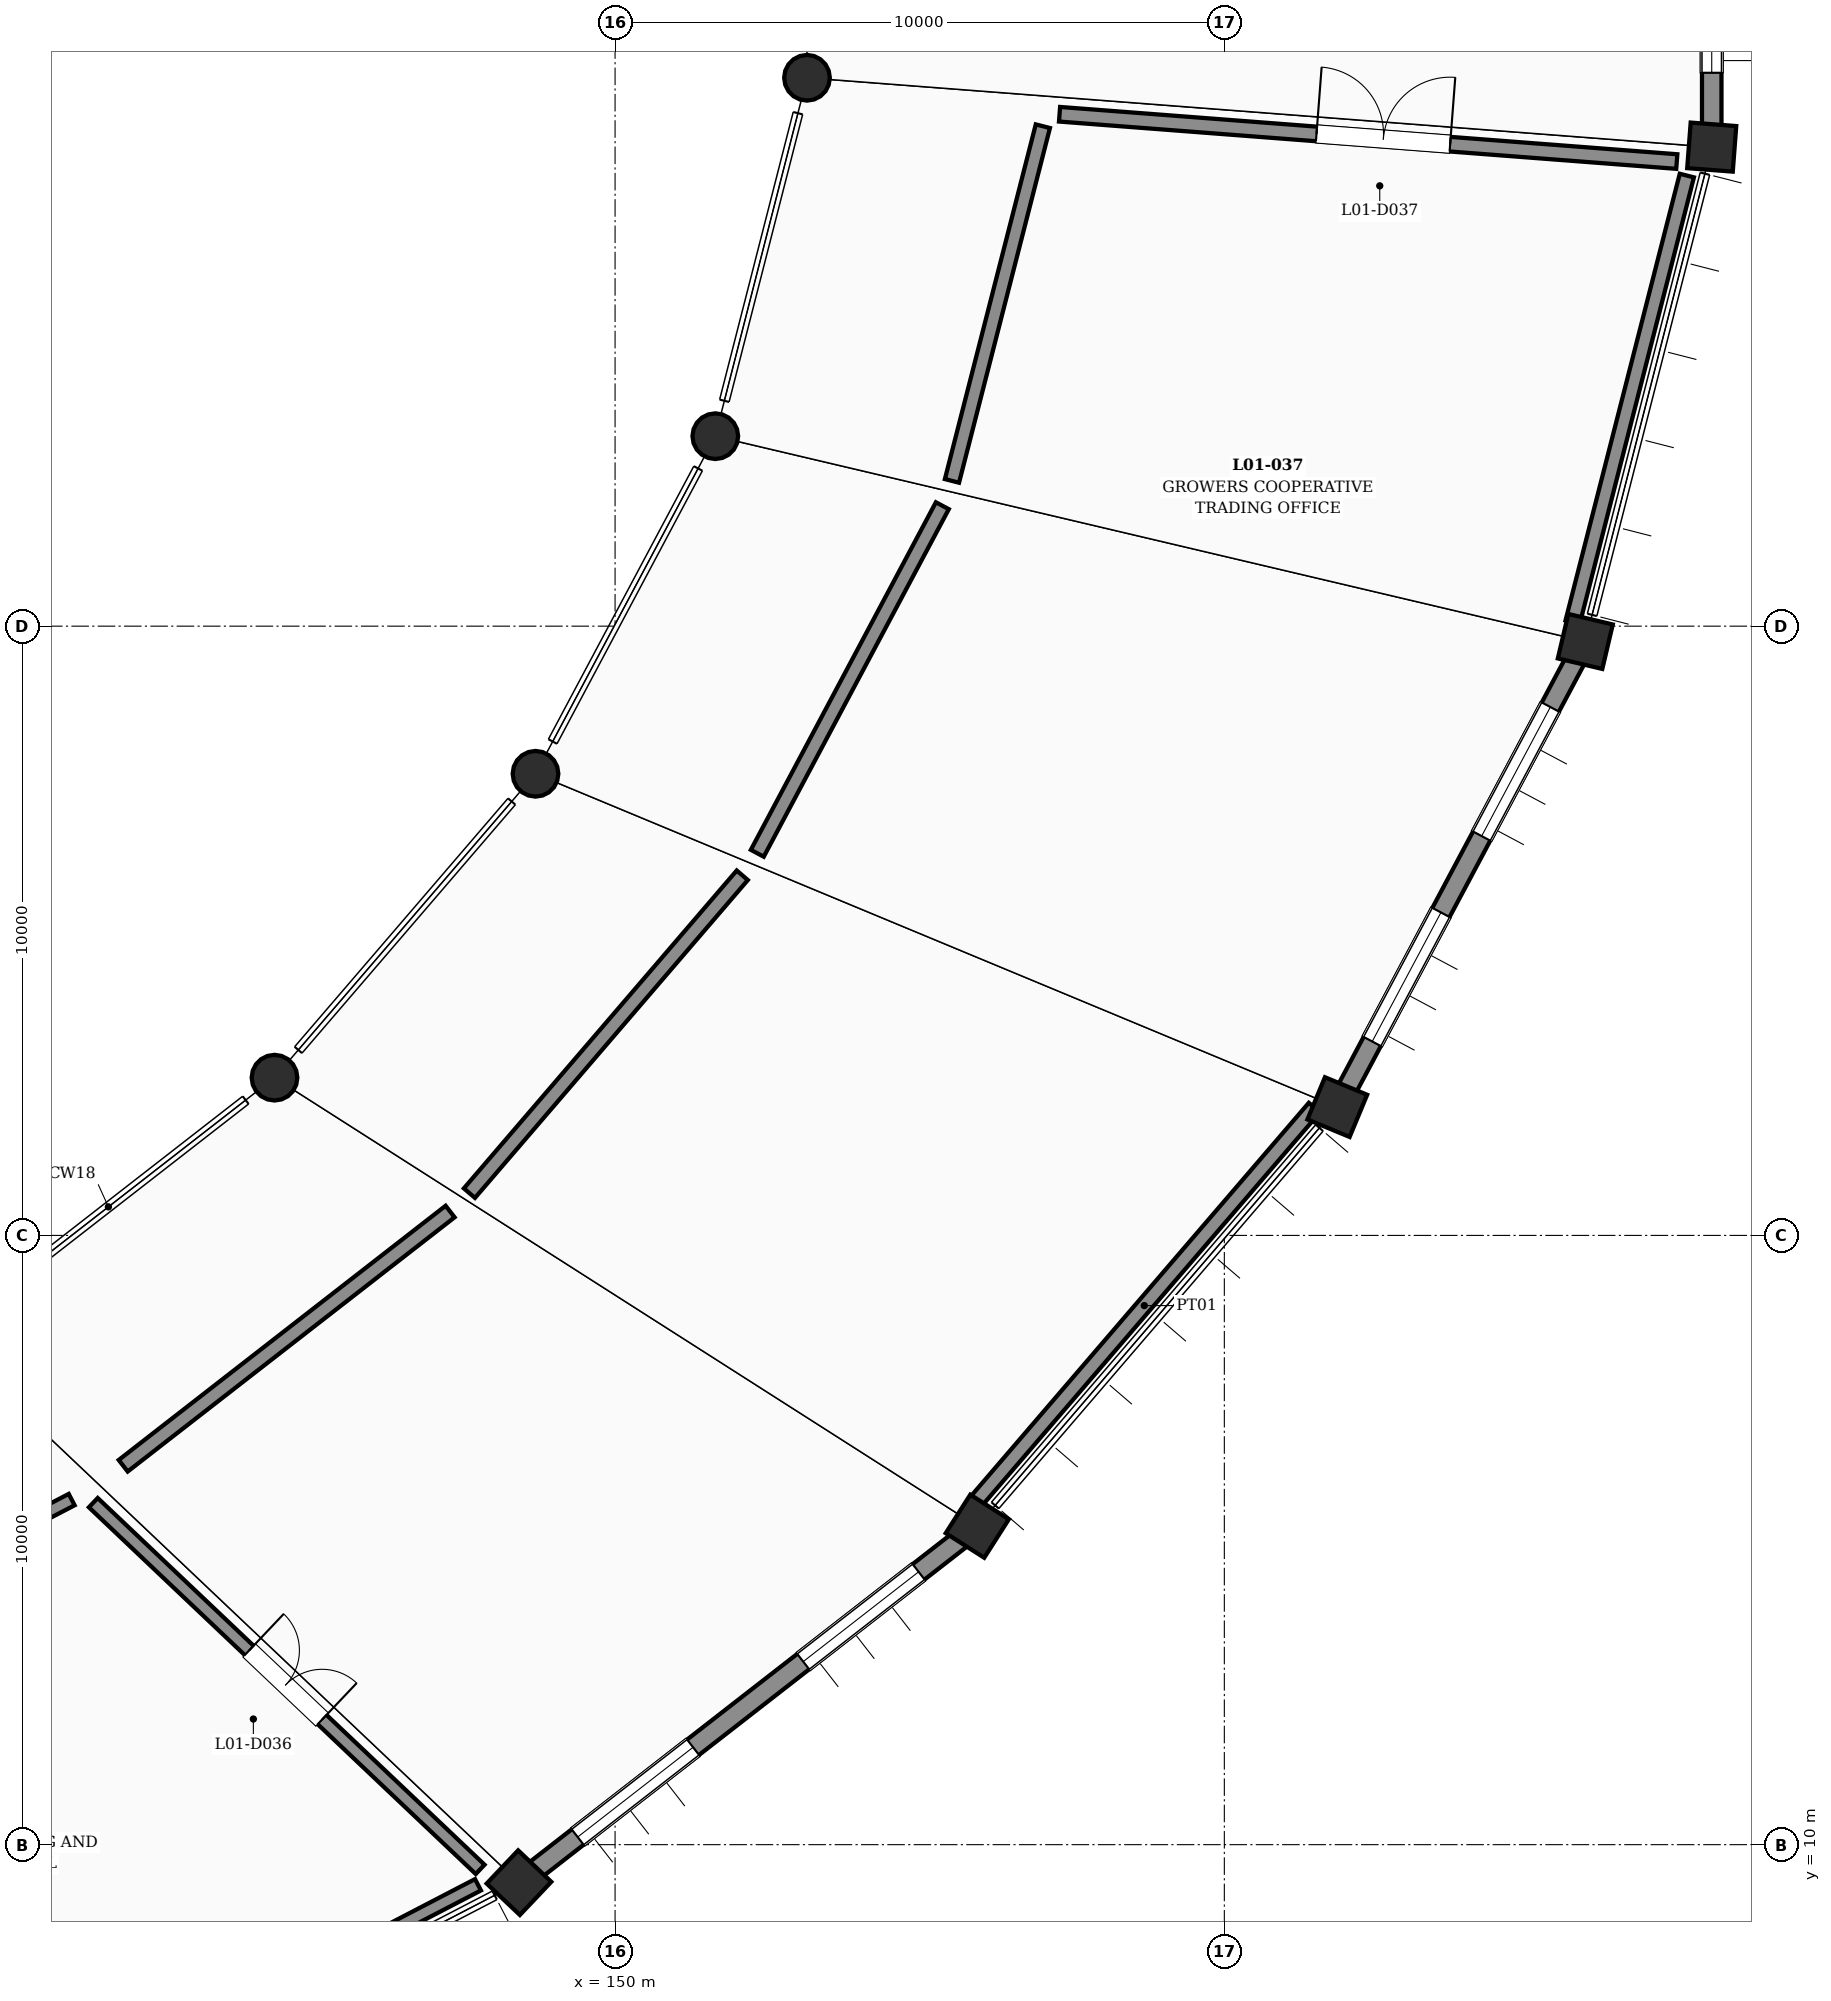
"""IFC4 building model, lengths in metres.
Left out: names, types, materials, properties, quantities, classifications, styles, units other than length and angle.
Written with IfcOpenShell. Run it as: python <this file> out.ifc"""

import sys

from ifc_helpers import new_model, si_unit, direction, frame, frame_2d, origin, origin_2d, place, context, subcontext, project, spatial, rectangle, circle, extrude, element, fill, save


model = new_model("IFC4")
c1 = context("Model", 3, precision=1e-05, world=origin(), true_north=direction((0.0, 1.0)))
c2 = subcontext(c1, "Body", "Model", "MODEL_VIEW")
j1 = project(units=[si_unit("LENGTHUNIT", "METRE"), si_unit("PLANEANGLEUNIT", "RADIAN")], contexts=[c1])
p1 = place(None, origin())
s1 = spatial("IfcSite", under=j1, at=p1, CompositionType="ELEMENT")
p2 = place(p1, origin())
s2 = spatial("IfcBuilding", under=s1, at=p2, CompositionType="ELEMENT")
p3 = place(p2, frame((0.0, 0.0, 6.0)))
s3 = spatial("IfcBuildingStorey", under=s2, at=p3, CompositionType="ELEMENT", Elevation=6.0)
for number, where, z_axis, x_axis in (
    (1, (148.423, 9.376, 0.0), (0.0, 0.0, 1.0), (0.688, 0.726, 0.0)),
    (2, (155.945, 15.227, 0.0), (0.0, 0.0, 1.0), (0.538, 0.843, 0.0)),
):
    element("IfcColumn", number, at=place(p3, frame(where, z_axis=z_axis, x_axis=x_axis)), inside=s3, PredefinedType="COLUMN", context=c2, shape_type="SweptSolid", body=[
        extrude(rectangle(XDim=0.75, YDim=0.75, at=origin_2d()), origin(), (0.0, 0.0, 1.0), 4.8),
    ])
p4 = place(p3, frame((144.41, 22.589, 0.0), z_axis=(0.0, 0.0, 1.0), x_axis=(1.0, 0.0, 0.0)))
e3 = element("IfcColumn", 3, at=p4, inside=s3, PredefinedType="COLUMN", context=c2, shape_type="SweptSolid", body=[
    extrude(circle(Radius=0.375, at=origin_2d()), origin(), (0.0, 0.0, 1.0), 4.8),
])
p5 = place(p3, frame((161.854, 22.106, 0.0), z_axis=(0.0, 0.0, 1.0), x_axis=(0.383811878264, 0.923411307113, 0.0)))
e4 = element("IfcColumn", 4, at=p5, inside=s3, PredefinedType="COLUMN", context=c2, shape_type="SweptSolid", body=[
    extrude(rectangle(XDim=0.75, YDim=0.75, at=origin_2d()), origin(), (0.0, 0.0, 1.0), 4.8),
])
p6 = place(p3, frame((148.694, 27.577, 0.0), z_axis=(0.0, 0.0, 1.0), x_axis=(1.0, 0.0, 0.0)))
e5 = element("IfcColumn", 5, at=p6, inside=s3, PredefinedType="COLUMN", context=c2, shape_type="SweptSolid", body=[
    extrude(circle(Radius=0.375, at=origin_2d()), origin(), (0.0, 0.0, 1.0), 4.8),
])
p7 = place(p3, frame((165.925, 29.749, 0.0), z_axis=(0.0, 0.0, 1.0), x_axis=(0.229710019669, 0.973259115993, 0.0)))
e6 = element("IfcColumn", 6, at=p7, inside=s3, PredefinedType="COLUMN", context=c2, shape_type="SweptSolid", body=[
    extrude(rectangle(XDim=0.75, YDim=0.75, at=origin_2d()), origin(), (0.0, 0.0, 1.0), 4.8),
])
p8 = place(p3, frame((151.645, 33.118, 0.0), z_axis=(0.0, 0.0, 1.0), x_axis=(1.0, 0.0, 0.0)))
e7 = element("IfcColumn", 7, at=p8, inside=s3, PredefinedType="COLUMN", context=c2, shape_type="SweptSolid", body=[
    extrude(circle(Radius=0.375, at=origin_2d()), origin(), (0.0, 0.0, 1.0), 4.8),
])
p9 = place(p3, frame((168.0, 37.863, 0.0), z_axis=(0.0, 0.0, 1.0), x_axis=(0.076370986393, 0.997079471475, 0.0)))
e8 = element("IfcColumn", 8, at=p9, inside=s3, PredefinedType="COLUMN", context=c2, shape_type="SweptSolid", body=[
    extrude(rectangle(XDim=0.75, YDim=0.75, at=origin_2d()), origin(), (0.0, 0.0, 1.0), 4.8),
])
p10 = place(p3, frame((153.15, 39.001, 0.0), z_axis=(0.0, 0.0, 1.0), x_axis=(1.0, 0.0, 0.0)))
e9 = element("IfcColumn", 9, at=p10, inside=s3, PredefinedType="COLUMN", context=c2, shape_type="SweptSolid", body=[
    extrude(circle(Radius=0.375, at=origin_2d()), origin(), (0.0, 0.0, 1.0), 4.8),
])
p11 = place(p3, frame((148.636, 9.542, 0.0), z_axis=(0.0, 0.0, 1.0), x_axis=(0.789327357341, 0.613972575082, 0.0)))
e10 = element("IfcWall", 10, at=p11, inside=s3, PredefinedType="SOLIDWALL", context=c2, shape_type="SweptSolid", body=[
    extrude(rectangle(XDim=8.99, YDim=0.32, at=frame_2d((4.495, 0.0))), origin(), (0.0, 0.0, 1.0), 3.61),
])
p12 = place(p11, frame((0.95, 0.0, 0.95)))
e11 = element("IfcOpeningElement", 11, at=p12, cuts=e10, PredefinedType="OPENING", context=c2, shape_type="SweptSolid", body=[
    extrude(rectangle(XDim=2.4, YDim=2.1, at=frame_2d((1.2, 1.05))), frame((0.0, 0.17, 0.0), z_axis=(0.0, -1.0, 0.0), x_axis=(1.0, 0.0, 0.0)), (0.0, 0.0, 1.0), 0.34),
])
p13 = place(p11, frame((5.64, 0.0, 0.95)))
e12 = element("IfcOpeningElement", 12, at=p13, cuts=e10, PredefinedType="OPENING", context=c2, shape_type="SweptSolid", body=[
    extrude(rectangle(XDim=2.4, YDim=2.1, at=frame_2d((1.2, 1.05))), frame((0.0, 0.17, 0.0), z_axis=(0.0, -1.0, 0.0), x_axis=(1.0, 0.0, 0.0)), (0.0, 0.0, 1.0), 0.34),
])
p14 = place(p3, frame((161.981, 22.344, 0.0), z_axis=(0.0, 0.0, 1.0), x_axis=(0.47010905891, 0.882608334841, 0.0)))
e13 = element("IfcWall", 13, at=p14, inside=s3, PredefinedType="SOLIDWALL", context=c2, shape_type="SweptSolid", body=[
    extrude(rectangle(XDim=8.12, YDim=0.32, at=frame_2d((4.06, 0.0))), origin(), (0.0, 0.0, 1.0), 3.61),
])
p15 = place(p14, frame((0.95, 0.0, 0.95)))
e14 = element("IfcOpeningElement", 14, at=p15, cuts=e13, PredefinedType="OPENING", context=c2, shape_type="SweptSolid", body=[
    extrude(rectangle(XDim=2.4, YDim=2.1, at=frame_2d((1.2, 1.05))), frame((0.0, 0.17, 0.0), z_axis=(0.0, -1.0, 0.0), x_axis=(1.0, 0.0, 0.0)), (0.0, 0.0, 1.0), 0.34),
])
p16 = place(p14, frame((4.77, 0.0, 0.95)))
e15 = element("IfcOpeningElement", 15, at=p16, cuts=e13, PredefinedType="OPENING", context=c2, shape_type="SweptSolid", body=[
    extrude(rectangle(XDim=2.4, YDim=2.1, at=frame_2d((1.2, 1.05))), frame((0.0, 0.17, 0.0), z_axis=(0.0, -1.0, 0.0), x_axis=(1.0, 0.0, 0.0)), (0.0, 0.0, 1.0), 0.34),
])
p17 = place(p3, frame((168.0, 38.133, 0.0), z_axis=(0.0, 0.0, 1.0), x_axis=(0.0, 1.0, 0.0)))
e16 = element("IfcWall", 16, at=p17, inside=s3, PredefinedType="SOLIDWALL", context=c2, shape_type="SweptSolid", body=[
    extrude(rectangle(XDim=7.734, YDim=0.32, at=frame_2d((3.867, 0.0))), origin(), (0.0, 0.0, 1.0), 3.61),
])
p18 = place(p17, frame((0.95, 0.0, 0.95)))
e17 = element("IfcOpeningElement", 17, at=p18, cuts=e16, PredefinedType="OPENING", context=c2, shape_type="SweptSolid", body=[
    extrude(rectangle(XDim=2.4, YDim=2.1, at=frame_2d((1.2, 1.05))), frame((0.0, 0.17, 0.0), z_axis=(0.0, -1.0, 0.0), x_axis=(1.0, 0.0, 0.0)), (0.0, 0.0, 1.0), 0.34),
])
p19 = place(p17, frame((4.384, 0.0, 0.95)))
e18 = element("IfcOpeningElement", 18, at=p19, cuts=e16, PredefinedType="OPENING", context=c2, shape_type="SweptSolid", body=[
    extrude(rectangle(XDim=2.4, YDim=2.1, at=frame_2d((1.2, 1.05))), frame((0.0, 0.17, 0.0), z_axis=(0.0, -1.0, 0.0), x_axis=(1.0, 0.0, 0.0)), (0.0, 0.0, 1.0), 0.34),
])
p20 = place(p3, frame((134.625, 12.309, 0.0), z_axis=(0.0, 0.0, 1.0), x_axis=(0.887324465007, 0.461145631878, 0.0)))
e19 = element("IfcWall", 19, at=p20, inside=s3, PredefinedType="PARTITIONING", context=c2, shape_type="SweptSolid", body=[
    extrude(rectangle(XDim=7.275, YDim=0.21, at=frame_2d((3.638, 0.0))), origin(), (0.0, 0.0, 1.0), 4.46),
])
p21 = place(p3, frame((141.436, 15.614, 0.0), z_axis=(0.0, 0.0, 1.0), x_axis=(0.725745871032, -0.687962884667, 0.0)))
e20 = element("IfcWall", 20, at=p21, inside=s3, PredefinedType="PARTITIONING", context=c2, shape_type="SweptSolid", body=[
    extrude(rectangle(XDim=8.749, YDim=0.21, at=frame_2d((4.375, 0.0))), origin(), (0.0, 0.0, 1.0), 3.56),
])
p22 = place(p21, frame((3.525, 0.0, 0.0)))
e21 = element("IfcOpeningElement", 21, at=p22, cuts=e20, PredefinedType="OPENING", context=c2, shape_type="SweptSolid", body=[
    extrude(rectangle(XDim=1.65, YDim=2.25, at=frame_2d((0.825, 1.125))), frame((0.0, 0.115, 0.0), z_axis=(0.0, -1.0, 0.0), x_axis=(1.0, 0.0, 0.0)), (0.0, 0.0, 1.0), 0.23),
])
p23 = place(p3, frame((147.75, 9.342, 0.0), z_axis=(0.0, 0.0, 1.0), x_axis=(-0.887317698476, -0.461158651627, 0.0)))
e22 = element("IfcWall", 22, at=p23, inside=s3, PredefinedType="PARTITIONING", context=c2, shape_type="SweptSolid", body=[
    extrude(rectangle(XDim=9.11, YDim=0.21, at=frame_2d((4.555, 0.0))), origin(), (0.0, 0.0, 1.0), 3.61),
])
p24 = place(p3, frame((147.609, 20.694, 0.0), z_axis=(0.0, 0.0, 1.0), x_axis=(0.651320491165, 0.758802752887, 0.0)))
e23 = element("IfcWall", 23, at=p24, inside=s3, PredefinedType="PARTITIONING", context=c2, shape_type="SweptSolid", body=[
    extrude(rectangle(XDim=6.876, YDim=0.24, at=frame_2d((3.438, 0.0))), origin(), (0.0, 0.0, 1.0), 4.46),
])
p25 = place(p3, frame((152.334, 26.272, 0.0), z_axis=(0.0, 0.0, 1.0), x_axis=(0.4699449875, 0.882695705622, 0.0)))
e24 = element("IfcWall", 24, at=p25, inside=s3, PredefinedType="PARTITIONING", context=c2, shape_type="SweptSolid", body=[
    extrude(rectangle(XDim=6.463, YDim=0.24, at=frame_2d((3.231, 0.0))), origin(), (0.0, 0.0, 1.0), 4.46),
])
p26 = place(p3, frame((155.53, 32.384, 0.0), z_axis=(0.0, 0.0, 1.0), x_axis=(0.248247314143, 0.968696686802, 0.0)))
e25 = element("IfcWall", 25, at=p26, inside=s3, PredefinedType="PARTITIONING", context=c2, shape_type="SweptSolid", body=[
    extrude(rectangle(XDim=6.01, YDim=0.24, at=frame_2d((3.005, 0.0))), origin(), (0.0, 0.0, 1.0), 4.46),
])
p27 = place(p3, frame((157.295, 38.402, 0.0), z_axis=(0.0, 0.0, 1.0), x_axis=(0.997076634039, -0.076408022176, 0.0)))
e26 = element("IfcWall", 26, at=p27, inside=s3, PredefinedType="PARTITIONING", context=c2, shape_type="SweptSolid", body=[
    extrude(rectangle(XDim=10.161, YDim=0.24, at=frame_2d((5.081, 0.0))), origin(), (0.0, 0.0, 1.0), 3.56),
])
p28 = place(p27, frame((4.23, 0.0, 0.0)))
e27 = element("IfcOpeningElement", 27, at=p28, cuts=e26, PredefinedType="OPENING", context=c2, shape_type="SweptSolid", body=[
    extrude(rectangle(XDim=2.2, YDim=2.35, at=frame_2d((1.1, 1.175))), frame((0.0, 0.13, 0.0), z_axis=(0.0, -1.0, 0.0), x_axis=(1.0, 0.0, 0.0)), (0.0, 0.0, 1.0), 0.26),
])
p29 = place(p3, frame((167.592, 37.396, 0.0), z_axis=(0.0, 0.0, 1.0), x_axis=(-0.247762128405, -0.968820895588, 0.0)))
e28 = element("IfcWall", 28, at=p29, inside=s3, PredefinedType="PARTITIONING", context=c2, shape_type="SweptSolid", body=[
    extrude(rectangle(XDim=7.568, YDim=0.24, at=frame_2d((3.784, 0.0))), origin(), (0.0, 0.0, 1.0), 3.61),
])
p30 = place(p3, frame((161.478, 22.098, 0.0), z_axis=(0.0, 0.0, 1.0), x_axis=(-0.651588761732, -0.758572399699, 0.0)))
e29 = element("IfcWall", 29, at=p30, inside=s3, PredefinedType="PARTITIONING", context=c2, shape_type="SweptSolid", body=[
    extrude(rectangle(XDim=8.569, YDim=0.24, at=frame_2d((4.285, 0.0))), origin(), (0.0, 0.0, 1.0), 3.61),
])
p31 = place(p3, frame((141.927, 16.219, 0.0), z_axis=(0.0, 0.0, 1.0), x_axis=(0.789373491507, 0.613913260083, 0.0)))
e30 = element("IfcWall", 30, at=p31, inside=s3, PredefinedType="PARTITIONING", context=c2, shape_type="SweptSolid", body=[
    extrude(rectangle(XDim=6.797, YDim=0.24, at=frame_2d((3.398, 0.0))), origin(), (0.0, 0.0, 1.0), 4.46),
])
p32 = place(p12, origin())
e31 = element("IfcWindow", 31, at=p32, inside=s3, PartitioningType="SINGLE_PANEL", PredefinedType="WINDOW", context=c2, shape_type="SweptSolid", body=[
    extrude(rectangle(XDim=2.4, YDim=2.1, at=frame_2d((1.2, 1.05))), frame((0.0, 0.03, 0.0), z_axis=(0.0, -1.0, 0.0), x_axis=(1.0, 0.0, 0.0)), (0.0, 0.0, 1.0), 0.06),
])
fill(e11, e31)
p33 = place(p13, origin())
e32 = element("IfcWindow", 32, at=p33, inside=s3, PartitioningType="SINGLE_PANEL", PredefinedType="WINDOW", context=c2, shape_type="SweptSolid", body=[
    extrude(rectangle(XDim=2.4, YDim=2.1, at=frame_2d((1.2, 1.05))), frame((0.0, 0.03, 0.0), z_axis=(0.0, -1.0, 0.0), x_axis=(1.0, 0.0, 0.0)), (0.0, 0.0, 1.0), 0.06),
])
fill(e12, e32)
p34 = place(p15, origin())
e33 = element("IfcWindow", 33, at=p34, inside=s3, PartitioningType="SINGLE_PANEL", PredefinedType="WINDOW", context=c2, shape_type="SweptSolid", body=[
    extrude(rectangle(XDim=2.4, YDim=2.1, at=frame_2d((1.2, 1.05))), frame((0.0, 0.03, 0.0), z_axis=(0.0, -1.0, 0.0), x_axis=(1.0, 0.0, 0.0)), (0.0, 0.0, 1.0), 0.06),
])
fill(e14, e33)
p35 = place(p16, origin())
e34 = element("IfcWindow", 34, at=p35, inside=s3, PartitioningType="SINGLE_PANEL", PredefinedType="WINDOW", context=c2, shape_type="SweptSolid", body=[
    extrude(rectangle(XDim=2.4, YDim=2.1, at=frame_2d((1.2, 1.05))), frame((0.0, 0.03, 0.0), z_axis=(0.0, -1.0, 0.0), x_axis=(1.0, 0.0, 0.0)), (0.0, 0.0, 1.0), 0.06),
])
fill(e15, e34)
p36 = place(p18, origin())
e35 = element("IfcWindow", 35, at=p36, inside=s3, PartitioningType="SINGLE_PANEL", PredefinedType="WINDOW", context=c2, shape_type="SweptSolid", body=[
    extrude(rectangle(XDim=2.4, YDim=2.1, at=frame_2d((1.2, 1.05))), frame((0.0, 0.03, 0.0), z_axis=(0.0, -1.0, 0.0), x_axis=(1.0, 0.0, 0.0)), (0.0, 0.0, 1.0), 0.06),
])
fill(e17, e35)
p37 = place(p22, origin())
e36 = element("IfcDoor", 36, at=p37, inside=s3, OperationType="DOUBLE_DOOR_SINGLE_SWING", PredefinedType="DOOR", context=c2, shape_type="SweptSolid", body=[
    extrude(rectangle(XDim=1.65, YDim=2.25, at=frame_2d((0.825, 1.125))), frame((0.0, 0.025, 0.0), z_axis=(0.0, -1.0, 0.0), x_axis=(1.0, 0.0, 0.0)), (0.0, 0.0, 1.0), 0.05),
])
fill(e21, e36)
p38 = place(p28, origin())
e37 = element("IfcDoor", 37, at=p38, inside=s3, OperationType="DOUBLE_DOOR_SINGLE_SWING", PredefinedType="DOOR", context=c2, shape_type="SweptSolid", body=[
    extrude(rectangle(XDim=2.2, YDim=2.35, at=frame_2d((1.1, 1.175))), frame((0.0, 0.025, 0.0), z_axis=(0.0, -1.0, 0.0), x_axis=(1.0, 0.0, 0.0)), (0.0, 0.0, 1.0), 0.05),
])
fill(e27, e37)
save(model, sys.argv[1])
